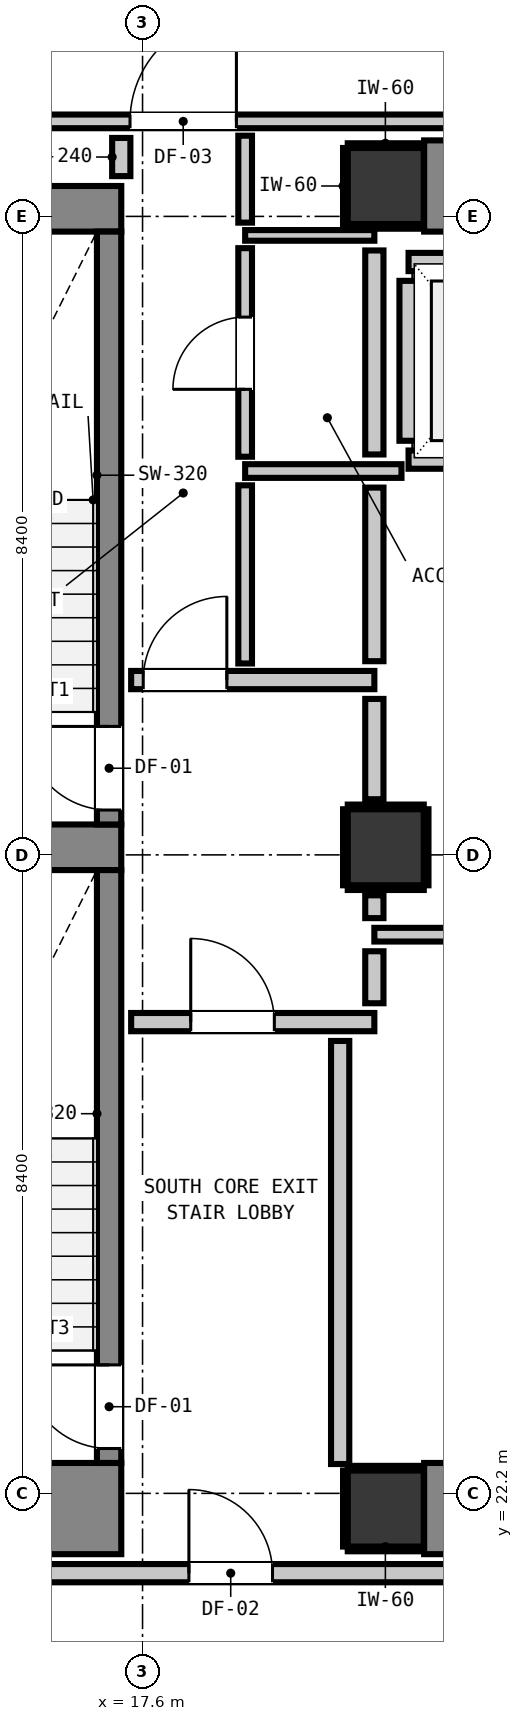
"""IFC4 building model, lengths in metres.
Left out: names, types, materials, properties, quantities, classifications, styles, units other than length and angle.
Written with IfcOpenShell. Run it as: python <this file> out.ifc"""

import sys

from ifc_helpers import new_model, si_unit, direction, frame, frame_2d, origin, origin_2d, place, context, subcontext, project, spatial, rectangle, extrude, element, fill, save


model = new_model("IFC4")
c1 = context("Model", 3, precision=1e-05, world=origin(), true_north=direction((0.0, 1.0)))
c2 = subcontext(c1, "Body", "Model", "MODEL_VIEW")
j1 = project(units=[si_unit("LENGTHUNIT", "METRE"), si_unit("PLANEANGLEUNIT", "RADIAN")], contexts=[c1])
p1 = place(None, origin())
s1 = spatial("IfcSite", under=j1, at=p1, CompositionType="ELEMENT")
p2 = place(p1, origin())
s2 = spatial("IfcBuilding", under=s1, at=p2, CompositionType="ELEMENT")
p3 = place(p2, frame((0.0, 0.0, 45.24)))
s3 = spatial("IfcBuildingStorey", under=s2, at=p3, CompositionType="ELEMENT", Elevation=45.24)
for number, where, z_axis, x_axis in (
    (1, (20.8, 22.0, 0.0), (0.0, 0.0, 1.0), (1.0, 0.0, 0.0)),
    (2, (20.8, 39.4, 0.0), (0.0, 0.0, 1.0), (1.0, 0.0, 0.0)),
):
    element("IfcColumn", number, at=place(p3, frame(where, z_axis=z_axis, x_axis=x_axis)), inside=s3, PredefinedType="COLUMN", context=c2, shape_type="SweptSolid", body=[
        extrude(rectangle(XDim=1.0, YDim=1.0, at=origin_2d()), origin(), (0.0, 0.0, 1.0), 3.32),
    ])
p4 = place(p3, frame((13.24, 22.0, 0.0), z_axis=(0.0, 0.0, 1.0), x_axis=(1.0, 0.0, 0.0)))
e3 = element("IfcWall", 3, at=p4, inside=s3, PredefinedType="SHEAR", context=c2, shape_type="SweptSolid", body=[
    extrude(rectangle(XDim=4.08, YDim=1.2, at=frame_2d((2.04, 0.0))), origin(), (0.0, 0.0, 1.0), 3.32),
])
p5 = place(p3, frame((13.24, 39.1, 0.0), z_axis=(0.0, 0.0, 1.0), x_axis=(1.0, 0.0, 0.0)))
e4 = element("IfcWall", 4, at=p5, inside=s3, PredefinedType="SHEAR", context=c2, shape_type="SweptSolid", body=[
    extrude(rectangle(XDim=4.08, YDim=0.6, at=frame_2d((2.04, 0.0))), origin(), (0.0, 0.0, 1.0), 3.32),
])
p6 = place(p3, frame((13.905, 30.7, 0.0), z_axis=(0.0, 0.0, 1.0), x_axis=(1.0, 0.0, 0.0)))
e5 = element("IfcWall", 5, at=p6, inside=s3, PredefinedType="SHEAR", context=c2, shape_type="SweptSolid", body=[
    extrude(rectangle(XDim=3.415, YDim=0.6, at=frame_2d((1.708, 0.0))), origin(), (0.0, 0.0, 1.0), 3.32),
])
for number, where, z_axis, x_axis in (
    (6, (21.305, 22.0, 0.0), (0.0, 0.0, 1.0), (1.0, 0.0, 0.0)),
    (7, (21.305, 39.4, 0.0), (0.0, 0.0, 1.0), (1.0, 0.0, 0.0)),
):
    element("IfcWall", number, at=place(p3, frame(where, z_axis=z_axis, x_axis=x_axis)), inside=s3, PredefinedType="SHEAR", context=c2, shape_type="SweptSolid", body=[
        extrude(rectangle(XDim=7.39, YDim=1.2, at=frame_2d((3.695, 0.0))), origin(), (0.0, 0.0, 1.0), 3.32),
    ])
p7 = place(p3, frame((17.16, 31.0, 0.0), z_axis=(0.0, 0.0, 1.0), x_axis=(0.0, 1.0, 0.0)))
e8 = element("IfcWall", 8, at=p7, inside=s3, PredefinedType="SHEAR", context=c2, shape_type="SweptSolid", body=[
    extrude(rectangle(XDim=7.8, YDim=0.32, at=frame_2d((3.9, 0.0))), origin(), (0.0, 0.0, 1.0), 3.32),
])
p8 = place(p7, frame((0.19, 0.0, 0.0)))
e9 = element("IfcOpeningElement", 9, at=p8, cuts=e8, PredefinedType="OPENING", context=c2, shape_type="SweptSolid", body=[
    extrude(rectangle(XDim=1.1, YDim=2.15, at=frame_2d((0.55, 1.075))), frame((0.0, 0.17, 0.0), z_axis=(0.0, -1.0, 0.0), x_axis=(1.0, 0.0, 0.0)), (0.0, 0.0, 1.0), 0.34),
])
p9 = place(p3, frame((17.16, 22.6, 0.0), z_axis=(0.0, 0.0, 1.0), x_axis=(0.0, 1.0, 0.0)))
e10 = element("IfcWall", 10, at=p9, inside=s3, PredefinedType="SHEAR", context=c2, shape_type="SweptSolid", body=[
    extrude(rectangle(XDim=7.8, YDim=0.32, at=frame_2d((3.9, 0.0))), origin(), (0.0, 0.0, 1.0), 3.32),
])
p10 = place(p9, frame((0.19, 0.0, 0.0)))
e11 = element("IfcOpeningElement", 11, at=p10, cuts=e10, PredefinedType="OPENING", context=c2, shape_type="SweptSolid", body=[
    extrude(rectangle(XDim=1.1, YDim=2.15, at=frame_2d((0.55, 1.075))), frame((0.0, 0.17, 0.0), z_axis=(0.0, -1.0, 0.0), x_axis=(1.0, 0.0, 0.0)), (0.0, 0.0, 1.0), 0.34),
])
p11 = place(p3, frame((20.8, 30.7, 0.0), z_axis=(0.0, 0.0, 1.0), x_axis=(1.0, 0.0, 0.0)))
e12 = element("IfcColumn", 12, at=p11, inside=s3, PredefinedType="COLUMN", context=c2, shape_type="SweptSolid", body=[
    extrude(rectangle(XDim=1.0, YDim=1.0, at=origin_2d()), origin(), (0.0, 0.0, 1.0), 3.32),
])
for number, where, z_axis, x_axis in (
    (13, (21.1, 35.8, 0.0), (0.0, 0.0, 1.0), (1.0, 0.0, 0.0)),
    (14, (21.1, 38.4, 0.0), (0.0, 0.0, 1.0), (1.0, 0.0, 0.0)),
):
    element("IfcWall", number, at=place(p3, frame(where, z_axis=z_axis, x_axis=x_axis)), inside=s3, PredefinedType="PARTITIONING", context=c2, shape_type="SweptSolid", body=[
        extrude(rectangle(XDim=2.2, YDim=0.24, at=frame_2d((1.1, 0.0))), origin(), (0.0, 0.0, 1.0), 3.06),
    ])
p12 = place(p3, frame((21.1, 36.048, 0.0), z_axis=(0.0, 0.0, 1.0), x_axis=(0.0, 1.0, 0.0)))
e15 = element("IfcWall", 15, at=p12, inside=s3, PredefinedType="PARTITIONING", context=c2, shape_type="SweptSolid", body=[
    extrude(rectangle(XDim=2.104, YDim=0.24, at=frame_2d((1.052, 0.0))), origin(), (0.0, 0.0, 1.0), 2.295),
])
p13 = place(p3, frame((10.15, 21.15, 0.0), z_axis=(0.0, 0.0, 1.0), x_axis=(1.0, 0.0, 0.0)))
e16 = element("IfcWall", 16, at=p13, inside=s3, PredefinedType="PARTITIONING", context=c2, shape_type="SweptSolid", body=[
    extrude(rectangle(XDim=40.023, YDim=0.24, at=frame_2d((20.012, 0.0))), origin(), (0.0, 0.0, 1.0), 3.06),
])
p14 = place(p13, frame((8.06, 0.0, 0.0)))
e17 = element("IfcOpeningElement", 17, at=p14, cuts=e16, PredefinedType="OPENING", context=c2, shape_type="SweptSolid", body=[
    extrude(rectangle(XDim=1.1, YDim=2.15, at=frame_2d((0.55, 1.075))), frame((0.0, 0.13, 0.0), z_axis=(0.0, -1.0, 0.0), x_axis=(1.0, 0.0, 0.0)), (0.0, 0.0, 1.0), 0.26),
])
p15 = place(p13, frame((0.324, 0.0, 0.0)))
e18 = element("IfcOpeningElement", 18, at=p15, cuts=e16, PredefinedType="OPENING", context=c2, shape_type="SweptSolid", body=[
    extrude(rectangle(XDim=1.4, YDim=2.15, at=frame_2d((0.7, 1.075))), frame((0.0, 0.13, 0.0), z_axis=(0.0, -1.0, 0.0), x_axis=(1.0, 0.0, 0.0)), (0.0, 0.0, 1.0), 0.26),
])
p16 = place(p13, frame((33.574, 0.0, 0.0)))
e19 = element("IfcOpeningElement", 19, at=p16, cuts=e16, PredefinedType="OPENING", context=c2, shape_type="SweptSolid", body=[
    extrude(rectangle(XDim=1.0, YDim=2.15, at=frame_2d((0.5, 1.075))), frame((0.0, 0.13, 0.0), z_axis=(0.0, -1.0, 0.0), x_axis=(1.0, 0.0, 0.0)), (0.0, 0.0, 1.0), 0.26),
])
p17 = place(p3, frame((17.45, 28.4, 0.0), z_axis=(0.0, 0.0, 1.0), x_axis=(1.0, 0.0, 0.0)))
e20 = element("IfcWall", 20, at=p17, inside=s3, PredefinedType="PARTITIONING", context=c2, shape_type="SweptSolid", body=[
    extrude(rectangle(XDim=3.2, YDim=0.24, at=frame_2d((1.6, 0.0))), origin(), (0.0, 0.0, 1.0), 3.06),
])
p18 = place(p17, frame((0.784, 0.0, 0.0)))
e21 = element("IfcOpeningElement", 21, at=p18, cuts=e20, PredefinedType="OPENING", context=c2, shape_type="SweptSolid", body=[
    extrude(rectangle(XDim=1.1, YDim=2.15, at=frame_2d((0.55, 1.075))), frame((0.0, 0.13, 0.0), z_axis=(0.0, -1.0, 0.0), x_axis=(1.0, 0.0, 0.0)), (0.0, 0.0, 1.0), 0.26),
])
p19 = place(p3, frame((17.45, 32.9, 0.0), z_axis=(0.0, 0.0, 1.0), x_axis=(1.0, 0.0, 0.0)))
e22 = element("IfcWall", 22, at=p19, inside=s3, PredefinedType="PARTITIONING", context=c2, shape_type="SweptSolid", body=[
    extrude(rectangle(XDim=3.2, YDim=0.24, at=frame_2d((1.6, 0.0))), origin(), (0.0, 0.0, 1.0), 3.06),
])
p20 = place(p19, frame((0.159, 0.0, 0.0)))
e23 = element("IfcOpeningElement", 23, at=p20, cuts=e22, PredefinedType="OPENING", context=c2, shape_type="SweptSolid", body=[
    extrude(rectangle(XDim=1.1, YDim=2.15, at=frame_2d((0.55, 1.075))), frame((0.0, 0.13, 0.0), z_axis=(0.0, -1.0, 0.0), x_axis=(1.0, 0.0, 0.0)), (0.0, 0.0, 1.0), 0.26),
])
p21 = place(p3, frame((20.65, 29.55, 0.0), z_axis=(0.0, 0.0, 1.0), x_axis=(1.0, 0.0, 0.0)))
e24 = element("IfcWall", 24, at=p21, inside=s3, PredefinedType="PARTITIONING", context=c2, shape_type="SweptSolid", body=[
    extrude(rectangle(XDim=9.325, YDim=0.18, at=frame_2d((4.663, 0.0))), origin(), (0.0, 0.0, 1.0), 3.06),
])
p22 = place(p3, frame((18.95, 35.65, 0.0), z_axis=(0.0, 0.0, 1.0), x_axis=(1.0, 0.0, 0.0)))
e25 = element("IfcWall", 25, at=p22, inside=s3, PredefinedType="PARTITIONING", context=c2, shape_type="SweptSolid", body=[
    extrude(rectangle(XDim=2.057, YDim=0.18, at=frame_2d((1.029, 0.0))), origin(), (0.0, 0.0, 1.0), 3.06),
])
p23 = place(p3, frame((10.15, 40.25, 0.0), z_axis=(0.0, 0.0, 1.0), x_axis=(1.0, 0.0, 0.0)))
e26 = element("IfcWall", 26, at=p23, inside=s3, PredefinedType="PARTITIONING", context=c2, shape_type="SweptSolid", body=[
    extrude(rectangle(XDim=26.782, YDim=0.18, at=frame_2d((13.391, 0.0))), origin(), (0.0, 0.0, 1.0), 3.06),
])
p24 = place(p23, frame((7.285, 0.0, 0.0)))
e27 = element("IfcOpeningElement", 27, at=p24, cuts=e26, PredefinedType="OPENING", context=c2, shape_type="SweptSolid", body=[
    extrude(rectangle(XDim=1.4, YDim=2.15, at=frame_2d((0.7, 1.075))), frame((0.0, 0.1, 0.0), z_axis=(0.0, -1.0, 0.0), x_axis=(1.0, 0.0, 0.0)), (0.0, 0.0, 1.0), 0.2),
])
p25 = place(p23, frame((0.324, 0.0, 0.0)))
e28 = element("IfcOpeningElement", 28, at=p25, cuts=e26, PredefinedType="OPENING", context=c2, shape_type="SweptSolid", body=[
    extrude(rectangle(XDim=1.4, YDim=2.15, at=frame_2d((0.7, 1.075))), frame((0.0, 0.1, 0.0), z_axis=(0.0, -1.0, 0.0), x_axis=(1.0, 0.0, 0.0)), (0.0, 0.0, 1.0), 0.2),
])
p26 = place(p3, frame((18.95, 38.75, 0.0), z_axis=(0.0, 0.0, 1.0), x_axis=(1.0, 0.0, 0.0)))
e29 = element("IfcWall", 29, at=p26, inside=s3, PredefinedType="PARTITIONING", context=c2, shape_type="SweptSolid", body=[
    extrude(rectangle(XDim=1.7, YDim=0.14, at=frame_2d((0.85, 0.0))), origin(), (0.0, 0.0, 1.0), 3.06),
])
p27 = place(p3, frame((17.32, 39.53, 0.0), z_axis=(0.0, 0.0, 1.0), x_axis=(0.0, 1.0, 0.0)))
e30 = element("IfcWall", 30, at=p27, inside=s3, PredefinedType="PARTITIONING", context=c2, shape_type="SweptSolid", body=[
    extrude(rectangle(XDim=0.502, YDim=0.24, at=frame_2d((0.251, 0.0))), origin(), (0.0, 0.0, 1.0), 3.06),
])
p28 = place(p3, frame((20.2, 22.586, 0.0), z_axis=(0.0, 0.0, 1.0), x_axis=(0.0, 1.0, 0.0)))
e31 = element("IfcWall", 31, at=p28, inside=s3, PredefinedType="PARTITIONING", context=c2, shape_type="SweptSolid", body=[
    extrude(rectangle(XDim=5.566, YDim=0.24, at=frame_2d((2.783, 0.0))), origin(), (0.0, 0.0, 1.0), 3.06),
])
p29 = place(p3, frame((20.65, 28.648, 0.0), z_axis=(0.0, 0.0, 1.0), x_axis=(0.0, 1.0, 0.0)))
e32 = element("IfcWall", 32, at=p29, inside=s3, PredefinedType="PARTITIONING", context=c2, shape_type="SweptSolid", body=[
    extrude(rectangle(XDim=0.684, YDim=0.24, at=frame_2d((0.342, 0.0))), origin(), (0.0, 0.0, 1.0), 2.295),
])
p30 = place(p3, frame((20.65, 29.768, 0.0), z_axis=(0.0, 0.0, 1.0), x_axis=(0.0, 1.0, 0.0)))
e33 = element("IfcWall", 33, at=p30, inside=s3, PredefinedType="PARTITIONING", context=c2, shape_type="SweptSolid", body=[
    extrude(rectangle(XDim=0.3, YDim=0.24, at=frame_2d((0.15, 0.0))), origin(), (0.0, 0.0, 1.0), 2.295),
])
p31 = place(p3, frame((20.65, 31.332, 0.0), z_axis=(0.0, 0.0, 1.0), x_axis=(0.0, 1.0, 0.0)))
e34 = element("IfcWall", 34, at=p31, inside=s3, PredefinedType="PARTITIONING", context=c2, shape_type="SweptSolid", body=[
    extrude(rectangle(XDim=1.32, YDim=0.24, at=frame_2d((0.66, 0.0))), origin(), (0.0, 0.0, 1.0), 2.295),
])
p32 = place(p3, frame((20.65, 33.148, 0.0), z_axis=(0.0, 0.0, 1.0), x_axis=(0.0, 1.0, 0.0)))
e35 = element("IfcWall", 35, at=p32, inside=s3, PredefinedType="PARTITIONING", context=c2, shape_type="SweptSolid", body=[
    extrude(rectangle(XDim=2.284, YDim=0.24, at=frame_2d((1.142, 0.0))), origin(), (0.0, 0.0, 1.0), 2.295),
])
p33 = place(p3, frame((20.65, 35.868, 0.0), z_axis=(0.0, 0.0, 1.0), x_axis=(0.0, 1.0, 0.0)))
e36 = element("IfcWall", 36, at=p33, inside=s3, PredefinedType="PARTITIONING", context=c2, shape_type="SweptSolid", body=[
    extrude(rectangle(XDim=2.684, YDim=0.24, at=frame_2d((1.342, 0.0))), origin(), (0.0, 0.0, 1.0), 2.295),
])
p34 = place(p3, frame((18.95, 33.118, 0.0), z_axis=(0.0, 0.0, 1.0), x_axis=(0.0, 1.0, 0.0)))
e37 = element("IfcWall", 37, at=p34, inside=s3, PredefinedType="PARTITIONING", context=c2, shape_type="SweptSolid", body=[
    extrude(rectangle(XDim=2.344, YDim=0.18, at=frame_2d((1.172, 0.0))), origin(), (0.0, 0.0, 1.0), 3.06),
])
p35 = place(p3, frame((18.95, 35.838, 0.0), z_axis=(0.0, 0.0, 1.0), x_axis=(0.0, 1.0, 0.0)))
e38 = element("IfcWall", 38, at=p35, inside=s3, PredefinedType="PARTITIONING", context=c2, shape_type="SweptSolid", body=[
    extrude(rectangle(XDim=2.744, YDim=0.18, at=frame_2d((1.372, 0.0))), origin(), (0.0, 0.0, 1.0), 3.06),
])
p36 = place(p35, frame((0.887, 0.0, 0.0)))
e39 = element("IfcOpeningElement", 39, at=p36, cuts=e38, PredefinedType="OPENING", context=c2, shape_type="SweptSolid", body=[
    extrude(rectangle(XDim=0.95, YDim=2.1, at=frame_2d((0.475, 1.05))), frame((0.0, 0.1, 0.0), z_axis=(0.0, -1.0, 0.0), x_axis=(1.0, 0.0, 0.0)), (0.0, 0.0, 1.0), 0.2),
])
p37 = place(p3, frame((18.95, 38.918, 0.0), z_axis=(0.0, 0.0, 1.0), x_axis=(0.0, 1.0, 0.0)))
e40 = element("IfcWall", 40, at=p37, inside=s3, PredefinedType="PARTITIONING", context=c2, shape_type="SweptSolid", body=[
    extrude(rectangle(XDim=1.144, YDim=0.18, at=frame_2d((0.572, 0.0))), origin(), (0.0, 0.0, 1.0), 3.06),
])
for number, where, z_axis, x_axis in (
    (41, (20.3, 21.468, 0.0), (0.0, 0.0, 1.0), (1.0, 0.0, 0.0)),
    (42, (20.3, 22.532, 0.0), (0.0, 0.0, 1.0), (1.0, 0.0, 0.0)),
):
    element("IfcWall", number, at=place(p3, frame(where, z_axis=z_axis, x_axis=x_axis)), inside=s3, PredefinedType="PARTITIONING", context=c2, shape_type="SweptSolid", body=[
        extrude(rectangle(XDim=0.99, YDim=0.06, at=frame_2d((0.495, 0.0))), origin(), (0.0, 0.0, 1.0), 1.45),
    ])
p38 = place(p3, frame((20.268, 21.5, 0.0), z_axis=(0.0, 0.0, 1.0), x_axis=(0.0, 1.0, 0.0)))
e43 = element("IfcWall", 43, at=p38, inside=s3, PredefinedType="PARTITIONING", context=c2, shape_type="SweptSolid", body=[
    extrude(rectangle(XDim=1.0, YDim=0.06, at=frame_2d((0.5, 0.0))), origin(), (0.0, 0.0, 1.0), 1.45),
])
for number, where, z_axis, x_axis in (
    (44, (20.3, 38.868, 0.0), (0.0, 0.0, 1.0), (1.0, 0.0, 0.0)),
    (45, (20.3, 39.932, 0.0), (0.0, 0.0, 1.0), (1.0, 0.0, 0.0)),
):
    element("IfcWall", number, at=place(p3, frame(where, z_axis=z_axis, x_axis=x_axis)), inside=s3, PredefinedType="PARTITIONING", context=c2, shape_type="SweptSolid", body=[
        extrude(rectangle(XDim=0.99, YDim=0.06, at=frame_2d((0.495, 0.0))), origin(), (0.0, 0.0, 1.0), 1.45),
    ])
for number, where, z_axis, x_axis in (
    (46, (20.268, 38.9, 0.0), (0.0, 0.0, 1.0), (0.0, 1.0, 0.0)),
    (47, (20.3, 30.168, 0.0), (0.0, 0.0, 1.0), (1.0, 0.0, 0.0)),
    (48, (20.3, 31.232, 0.0), (0.0, 0.0, 1.0), (1.0, 0.0, 0.0)),
    (49, (20.268, 30.2, 0.0), (0.0, 0.0, 1.0), (0.0, 1.0, 0.0)),
    (50, (21.332, 30.2, 0.0), (0.0, 0.0, 1.0), (0.0, 1.0, 0.0)),
):
    element("IfcWall", number, at=place(p3, frame(where, z_axis=z_axis, x_axis=x_axis)), inside=s3, PredefinedType="PARTITIONING", context=c2, shape_type="SweptSolid", body=[
        extrude(rectangle(XDim=1.0, YDim=0.06, at=frame_2d((0.5, 0.0))), origin(), (0.0, 0.0, 1.0), 1.45),
    ])
p39 = place(p8, origin())
e51 = element("IfcDoor", 51, at=p39, inside=s3, OperationType="SINGLE_SWING_RIGHT", PredefinedType="DOOR", context=c2, shape_type="SweptSolid", body=[
    extrude(rectangle(XDim=1.1, YDim=2.15, at=frame_2d((0.55, 1.075))), frame((0.0, 0.025, 0.0), z_axis=(0.0, -1.0, 0.0), x_axis=(1.0, 0.0, 0.0)), (0.0, 0.0, 1.0), 0.05),
])
fill(e9, e51)
p40 = place(p10, origin())
e52 = element("IfcDoor", 52, at=p40, inside=s3, OperationType="SINGLE_SWING_RIGHT", PredefinedType="DOOR", context=c2, shape_type="SweptSolid", body=[
    extrude(rectangle(XDim=1.1, YDim=2.15, at=frame_2d((0.55, 1.075))), frame((0.0, 0.025, 0.0), z_axis=(0.0, -1.0, 0.0), x_axis=(1.0, 0.0, 0.0)), (0.0, 0.0, 1.0), 0.05),
])
fill(e11, e52)
p41 = place(p18, origin())
e53 = element("IfcDoor", 53, at=p41, inside=s3, OperationType="SINGLE_SWING_LEFT", PredefinedType="DOOR", context=c2, shape_type="SweptSolid", body=[
    extrude(rectangle(XDim=1.1, YDim=2.15, at=frame_2d((0.55, 1.075))), frame((0.0, 0.025, 0.0), z_axis=(0.0, -1.0, 0.0), x_axis=(1.0, 0.0, 0.0)), (0.0, 0.0, 1.0), 0.05),
])
fill(e21, e53)
p42 = place(p20, origin())
e54 = element("IfcDoor", 54, at=p42, inside=s3, OperationType="SINGLE_SWING_RIGHT", PredefinedType="DOOR", context=c2, shape_type="SweptSolid", body=[
    extrude(rectangle(XDim=1.1, YDim=2.15, at=frame_2d((0.55, 1.075))), frame((0.0, 0.025, 0.0), z_axis=(0.0, -1.0, 0.0), x_axis=(1.0, 0.0, 0.0)), (0.0, 0.0, 1.0), 0.05),
])
fill(e23, e54)
p43 = place(p14, origin())
e55 = element("IfcDoor", 55, at=p43, inside=s3, OperationType="SINGLE_SWING_LEFT", PredefinedType="DOOR", context=c2, shape_type="SweptSolid", body=[
    extrude(rectangle(XDim=1.1, YDim=2.15, at=frame_2d((0.55, 1.075))), frame((0.0, 0.025, 0.0), z_axis=(0.0, -1.0, 0.0), x_axis=(1.0, 0.0, 0.0)), (0.0, 0.0, 1.0), 0.05),
])
fill(e17, e55)
p44 = place(p24, origin())
e56 = element("IfcDoor", 56, at=p44, inside=s3, OperationType="SINGLE_SWING_RIGHT", PredefinedType="DOOR", context=c2, shape_type="SweptSolid", body=[
    extrude(rectangle(XDim=1.4, YDim=2.15, at=frame_2d((0.7, 1.075))), frame((0.0, 0.025, 0.0), z_axis=(0.0, -1.0, 0.0), x_axis=(1.0, 0.0, 0.0)), (0.0, 0.0, 1.0), 0.05),
])
fill(e27, e56)
p45 = place(p36, origin())
e57 = element("IfcDoor", 57, at=p45, inside=s3, OperationType="SINGLE_SWING_LEFT", PredefinedType="DOOR", context=c2, shape_type="SweptSolid", body=[
    extrude(rectangle(XDim=0.95, YDim=2.1, at=frame_2d((0.475, 1.05))), frame((0.0, 0.025, 0.0), z_axis=(0.0, -1.0, 0.0), x_axis=(1.0, 0.0, 0.0)), (0.0, 0.0, 1.0), 0.05),
])
fill(e39, e57)
save(model, sys.argv[1])
